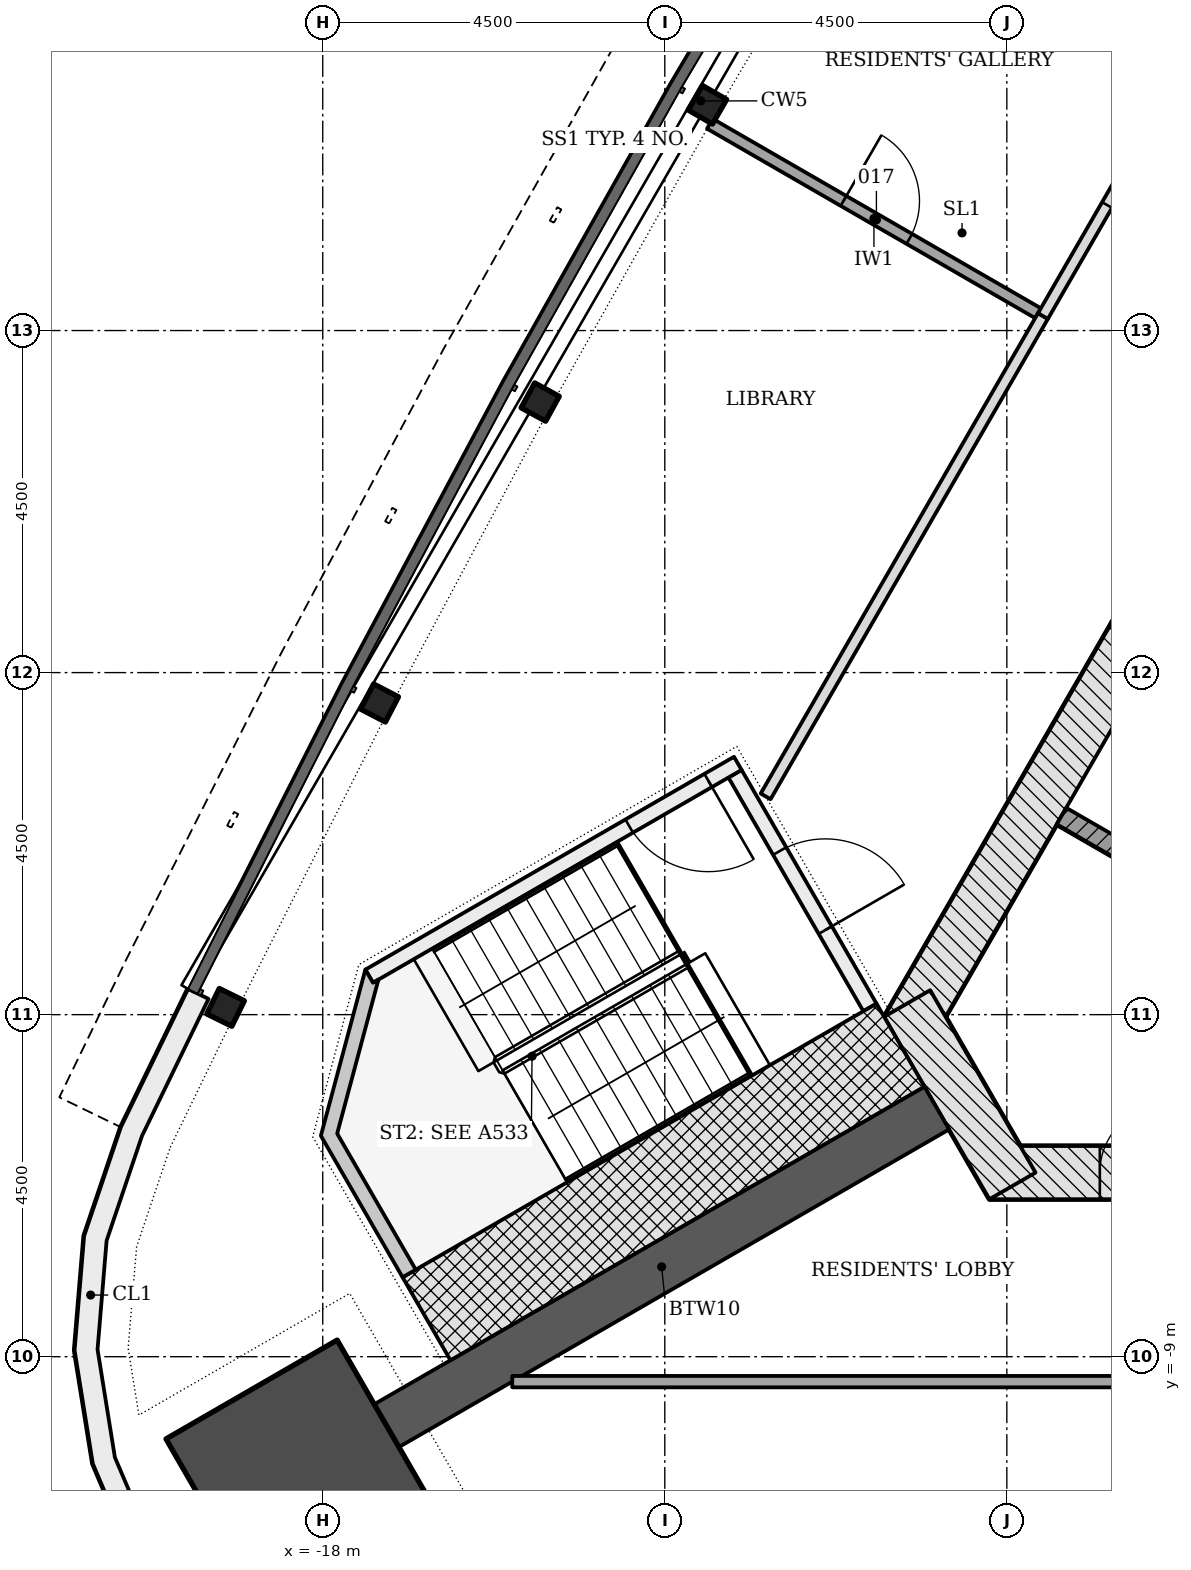
"""IFC4 building model, lengths in metres.
Left out: names, types, materials, properties, quantities, classifications, styles, units other than length and angle.
Written with IfcOpenShell. Run it as: python <this file> out.ifc"""

import sys

from ifc_helpers import new_model, si_unit, direction, frame, frame_2d, origin, origin_2d, place, context, subcontext, project, spatial, polyline, rectangle, i_section, outline, extrude, element, fill, save


model = new_model("IFC4")
c1 = context("Model", 3, precision=1e-05, world=origin(), true_north=direction((0.0, 1.0)))
c2 = subcontext(c1, "Body", "Model", "MODEL_VIEW")
j1 = project(units=[si_unit("LENGTHUNIT", "METRE"), si_unit("PLANEANGLEUNIT", "RADIAN")], contexts=[c1])
p1 = place(None, origin())
s1 = spatial("IfcSite", under=j1, at=p1, CompositionType="ELEMENT")
p2 = place(p1, origin())
s2 = spatial("IfcBuilding", under=s1, at=p2, CompositionType="ELEMENT")
p3 = place(p2, frame((0.0, 0.0, 214.8)))
s3 = spatial("IfcBuildingStorey", under=s2, at=p3, CompositionType="ELEMENT", Elevation=214.8)
p4 = place(p3, frame((-9.229, -6.578, -0.2), z_axis=(0.0, 0.0, 1.0), x_axis=(1.0, 0.0, 0.0)))
e1 = element("IfcWall", 1, at=p4, inside=s3, PredefinedType="SHEAR", context=c2, shape_type="SweptSolid", body=[
    extrude(rectangle(XDim=18.458, YDim=0.7, at=frame_2d((9.229, 0.0))), origin(), (0.0, 0.0, 1.0), 3.6),
])
p5 = place(p4, frame((6.7, 0.0, 0.2)))
e2 = element("IfcOpeningElement", 2, at=p5, cuts=e1, PredefinedType="OPENING", context=c2, shape_type="SweptSolid", body=[
    extrude(rectangle(XDim=1.0, YDim=2.1, at=frame_2d((0.5, 1.05))), frame((0.0, 0.36, 0.0), z_axis=(0.0, -1.0, 0.0), x_axis=(1.0, 0.0, 0.0)), (0.0, 0.0, 1.0), 0.72),
])
p6 = place(p4, frame((1.452, 0.0, 0.2)))
e3 = element("IfcOpeningElement", 3, at=p6, cuts=e1, PredefinedType="OPENING", context=c2, shape_type="SweptSolid", body=[
    extrude(rectangle(XDim=0.9, YDim=2.1, at=frame_2d((0.45, 1.05))), frame((0.0, 0.36, 0.0), z_axis=(0.0, -1.0, 0.0), x_axis=(1.0, 0.0, 0.0)), (0.0, 0.0, 1.0), 0.72),
])
p7 = place(p4, frame((4.45, 0.0, 0.2)))
e4 = element("IfcOpeningElement", 4, at=p7, cuts=e1, PredefinedType="OPENING", context=c2, shape_type="SweptSolid", body=[
    extrude(rectangle(XDim=1.0, YDim=2.1, at=frame_2d((0.5, 1.05))), frame((0.0, 0.36, 0.0), z_axis=(0.0, -1.0, 0.0), x_axis=(1.0, 0.0, 0.0)), (0.0, 0.0, 1.0), 0.72),
])
p8 = place(p4, frame((12.477, 0.0, 0.2)))
e5 = element("IfcOpeningElement", 5, at=p8, cuts=e1, PredefinedType="OPENING", context=c2, shape_type="SweptSolid", body=[
    extrude(rectangle(XDim=1.0, YDim=2.1, at=frame_2d((0.5, 1.05))), frame((0.0, 0.36, 0.0), z_axis=(0.0, -1.0, 0.0), x_axis=(1.0, 0.0, 0.0)), (0.0, 0.0, 1.0), 0.72),
])
p9 = place(p3, frame((-1.083, 11.281, -0.2), z_axis=(0.0, 0.0, 1.0), x_axis=(-0.500001446645, -0.866024568562, 0.0)))
e6 = element("IfcWall", 6, at=p9, inside=s3, PredefinedType="SHEAR", context=c2, shape_type="SweptSolid", body=[
    extrude(rectangle(XDim=18.458, YDim=0.7, at=frame_2d((9.229, 0.0))), origin(), (0.0, 0.0, 1.0), 3.6),
])
p10 = place(p9, frame((8.979, 0.0, 0.2)))
e7 = element("IfcOpeningElement", 7, at=p10, cuts=e6, PredefinedType="OPENING", context=c2, shape_type="SweptSolid", body=[
    extrude(rectangle(XDim=1.2, YDim=2.1, at=frame_2d((0.6, 1.05))), frame((0.0, 0.36, 0.0), z_axis=(0.0, -1.0, 0.0), x_axis=(1.0, 0.0, 0.0)), (0.0, 0.0, 1.0), 0.72),
])
p11 = place(p9, frame((11.029, 0.0, 0.2)))
e8 = element("IfcOpeningElement", 8, at=p11, cuts=e6, PredefinedType="OPENING", context=c2, shape_type="SweptSolid", body=[
    extrude(rectangle(XDim=1.2, YDim=2.1, at=frame_2d((0.6, 1.05))), frame((0.0, 0.36, 0.0), z_axis=(0.0, -1.0, 0.0), x_axis=(1.0, 0.0, 0.0)), (0.0, 0.0, 1.0), 0.72),
])
p12 = place(p3, frame((-10.311, -4.353, -0.2), z_axis=(0.0, 0.0, 1.0), x_axis=(0.500042739161, -0.866000726912, 0.0)))
e9 = element("IfcWall", 9, at=p12, inside=s3, PredefinedType="SHEAR", context=c2, shape_type="SweptSolid", body=[
    extrude(rectangle(XDim=2.771, YDim=0.7, at=frame_2d((1.386, 0.0))), origin(), (0.0, 0.0, 1.0), 3.6),
])
p13 = place(p3, frame((-9.922, -5.728, -0.2), z_axis=(0.0, 0.0, 1.0), x_axis=(-0.866030911543, -0.499990460161, 0.0)))
e10 = element("IfcWall", 10, at=p13, inside=s3, PredefinedType="SHEAR", context=c2, shape_type="SweptSolid", body=[
    extrude(rectangle(XDim=8.359, YDim=0.65, at=frame_2d((4.179, 0.0))), origin(), (0.0, 0.0, 1.0), 3.6),
])
p14 = place(p3, frame((-18.286, -10.558, -0.2), z_axis=(0.0, 0.0, 1.0), x_axis=(-0.866025403784, -0.5, 0.0)))
e11 = element("IfcColumn", 11, at=p14, inside=s3, PredefinedType="COLUMN", context=c2, shape_type="SweptSolid", body=[
    extrude(rectangle(XDim=2.6, YDim=2.6, at=origin_2d()), origin(), (0.0, 0.0, 1.0), 3.6),
])
for number, where, z_axis, x_axis in (
    (12, (-12.939, 7.47, -0.2), (0.0, 0.0, 1.0), (-0.5, -0.866, 0.0)),
    (13, (-15.14, 3.559, -0.2), (0.0, 0.0, 1.0), (-0.481, -0.877, 0.0)),
    (14, (-17.253, -0.4, -0.2), (0.0, 0.0, 1.0), (-0.461, -0.887, 0.0)),
    (15, (-19.279, -4.404, -0.2), (0.0, 0.0, 1.0), (-0.441, -0.897, 0.0)),
):
    element("IfcColumn", number, at=place(p3, frame(where, z_axis=z_axis, x_axis=x_axis)), inside=s3, PredefinedType="COLUMN", context=c2, shape_type="SweptSolid", body=[
        extrude(i_section(OverallWidth=0.373, OverallDepth=0.368, WebThickness=0.015, FlangeThickness=0.024, FilletRadius=0.015, at=origin_2d()), origin(), (0.0, 0.0, 1.0), 3.6),
    ])
p15 = place(p3, origin())
e16 = element("IfcWall", 16, at=p15, inside=s3, PredefinedType="NOTDEFINED", context=c2, shape_type="SweptSolid", body=[
    extrude(outline(polyline([(-19.772, -4.162), (-20.656, -5.98), (-21.139, -7.411), (-21.265, -8.917), (-21.025, -10.408), (-20.434, -11.797), (-19.526, -13.004), (-19.286, -12.824), (-20.172, -11.646), (-20.735, -10.324), (-20.963, -8.905), (-20.844, -7.473), (-20.378, -6.094), (-19.502, -4.293), (-19.772, -4.162)])), origin(), (0.0, 0.0, 1.0), 3.3),
])
p16 = place(p3, frame((-8.281, -1.887, -0.2), z_axis=(0.0, 0.0, 1.0), x_axis=(0.866032775405, -0.499987231761, 0.0)))
e17 = element("IfcWall", 17, at=p16, inside=s3, PredefinedType="PARTITIONING", context=c2, shape_type="SweptSolid", body=[
    extrude(rectangle(XDim=2.9, YDim=0.25, at=frame_2d((1.45, 0.0))), origin(), (0.0, 0.0, 1.0), 3.6),
])
p17 = place(p3, frame((-12.576, -1.331, -0.2), z_axis=(0.0, 0.0, 1.0), x_axis=(0.499970499736, -0.8660424351, 0.0)))
e18 = element("IfcWall", 18, at=p17, inside=s3, PredefinedType="SHEAR", context=c2, shape_type="SweptSolid", body=[
    extrude(rectangle(XDim=3.55, YDim=0.2, at=frame_2d((1.775, 0.0))), origin(), (0.0, 0.0, 1.0), 3.6),
])
p18 = place(p17, frame((1.175, 0.0, 0.2)))
e19 = element("IfcOpeningElement", 19, at=p18, cuts=e18, PredefinedType="OPENING", context=c2, shape_type="SweptSolid", body=[
    extrude(rectangle(XDim=1.2, YDim=2.1, at=frame_2d((0.6, 1.05))), frame((0.0, 0.11, 0.0), z_axis=(0.0, -1.0, 0.0), x_axis=(1.0, 0.0, 0.0)), (0.0, 0.0, 1.0), 0.22),
])
p19 = place(p3, frame((-12.539, -1.194, -0.2), z_axis=(0.0, 0.0, 1.0), x_axis=(-0.866045472092, -0.499965239061, 0.0)))
e20 = element("IfcWall", 20, at=p19, inside=s3, PredefinedType="SHEAR", context=c2, shape_type="SweptSolid", body=[
    extrude(rectangle(XDim=5.6, YDim=0.2, at=frame_2d((2.8, 0.0))), origin(), (0.0, 0.0, 1.0), 3.6),
])
p20 = place(p19, frame((0.45, 0.0, 0.2)))
e21 = element("IfcOpeningElement", 21, at=p20, cuts=e20, PredefinedType="OPENING", context=c2, shape_type="SweptSolid", body=[
    extrude(rectangle(XDim=1.2, YDim=2.1, at=frame_2d((0.6, 1.05))), frame((0.0, 0.11, 0.0), z_axis=(0.0, -1.0, 0.0), x_axis=(1.0, 0.0, 0.0)), (0.0, 0.0, 1.0), 0.22),
])
p21 = place(p3, frame((-10.399, -4.901, -0.2), z_axis=(0.0, 0.0, 1.0), x_axis=(-0.866018442252, -0.500012057535, 0.0)))
e22 = element("IfcWall", 22, at=p21, inside=s3, PredefinedType="SHEAR", context=c2, shape_type="SweptSolid", body=[
    extrude(rectangle(XDim=7.2, YDim=1.261, at=frame_2d((3.6, 0.0))), origin(), (0.0, 0.0, 1.0), 3.6),
])
p22 = place(p3, frame((0.0, 0.0, -0.2)))
e23 = element("IfcWall", 23, at=p22, inside=s3, PredefinedType="SHEAR", context=c2, shape_type="SweptSolid", body=[
    extrude(outline(polyline([(-17.439, -3.907), (-18.025, -6.093), (-16.95, -7.955), (-16.777, -7.855), (-17.81, -6.065), (-17.267, -4.039), (-17.339, -4.081), (-17.339, -4.081), (-17.339, -4.081), (-17.339, -4.081), (-17.339, -4.081), (-17.339, -4.081), (-17.339, -4.081), (-17.339, -4.081), (-17.339, -4.081), (-17.339, -4.081), (-17.339, -4.081), (-17.339, -4.081), (-17.339, -4.081), (-17.339, -4.081), (-17.339, -4.081), (-17.339, -4.081), (-17.339, -4.081), (-17.439, -3.907)])), origin(), (0.0, 0.0, 1.0), 3.6),
])
p23 = place(p3, frame((-15.507, -9.328, 0.0), z_axis=(0.0, 0.0, 1.0), x_axis=(1.0, 0.0, 0.0)))
e24 = element("IfcWall", 24, at=p23, inside=s3, PredefinedType="PARTITIONING", context=c2, shape_type="SweptSolid", body=[
    extrude(rectangle(XDim=23.234, YDim=0.15, at=frame_2d((11.617, 0.0))), origin(), (0.0, 0.0, 1.0), 2.852),
])
p24 = place(p23, frame((12.775, 0.0, 0.0)))
e25 = element("IfcOpeningElement", 25, at=p24, cuts=e24, PredefinedType="OPENING", context=c2, shape_type="SweptSolid", body=[
    extrude(rectangle(XDim=1.5, YDim=2.1, at=frame_2d((0.75, 1.05))), frame((0.0, 0.085, 0.0), z_axis=(0.0, -1.0, 0.0), x_axis=(1.0, 0.0, 0.0)), (0.0, 0.0, 1.0), 0.17),
])
p25 = place(p23, frame((18.971, 0.0, 0.0)))
e26 = element("IfcOpeningElement", 26, at=p25, cuts=e24, PredefinedType="OPENING", context=c2, shape_type="SweptSolid", body=[
    extrude(rectangle(XDim=1.0, YDim=2.1, at=frame_2d((0.5, 1.05))), frame((0.0, 0.085, 0.0), z_axis=(0.0, -1.0, 0.0), x_axis=(1.0, 0.0, 0.0)), (0.0, 0.0, 1.0), 0.17),
])
p26 = place(p3, frame((-8.525, 4.691, 0.0), z_axis=(0.0, 0.0, 1.0), x_axis=(-0.499986021771, -0.866033473968, 0.0)))
e27 = element("IfcWall", 27, at=p26, inside=s3, PredefinedType="PARTITIONING", context=c2, shape_type="SweptSolid", body=[
    extrude(rectangle(XDim=7.297, YDim=0.15, at=frame_2d((3.648, 0.0))), origin(), (0.0, 0.0, 1.0), 2.852),
])
p27 = place(p3, frame((-12.907, 7.221, 0.0), z_axis=(0.0, 0.0, 1.0), x_axis=(0.866031443676, -0.499989538455, 0.0)))
e28 = element("IfcWall", 28, at=p27, inside=s3, PredefinedType="PARTITIONING", context=c2, shape_type="SweptSolid", body=[
    extrude(rectangle(XDim=4.985, YDim=0.15, at=frame_2d((2.492, 0.0))), origin(), (0.0, 0.0, 1.0), 3.4),
])
p28 = place(p27, frame((2.03, 0.0, 0.0)))
e29 = element("IfcOpeningElement", 29, at=p28, cuts=e28, PredefinedType="OPENING", context=c2, shape_type="SweptSolid", body=[
    extrude(rectangle(XDim=1.0, YDim=2.1, at=frame_2d((0.5, 1.05))), frame((0.0, 0.085, 0.0), z_axis=(0.0, -1.0, 0.0), x_axis=(1.0, 0.0, 0.0)), (0.0, 0.0, 1.0), 0.17),
])
p29 = place(p3, frame((-6.338, 8.478, 0.0), z_axis=(0.0, 0.0, 1.0), x_axis=(-0.500005971936, -0.866021955858, 0.0)))
e30 = element("IfcWall", 30, at=p29, inside=s3, PredefinedType="PARTITIONING", context=c2, shape_type="SweptSolid", body=[
    extrude(rectangle(XDim=4.373, YDim=0.15, at=frame_2d((2.187, 0.0))), origin(), (0.0, 0.0, 1.0), 2.852),
])
p30 = place(p29, frame((1.687, 0.0, 0.0)))
e31 = element("IfcOpeningElement", 31, at=p30, cuts=e30, PredefinedType="OPENING", context=c2, shape_type="SweptSolid", body=[
    extrude(rectangle(XDim=1.0, YDim=2.1, at=frame_2d((0.5, 1.05))), frame((0.0, 0.085, 0.0), z_axis=(0.0, -1.0, 0.0), x_axis=(1.0, 0.0, 0.0)), (0.0, 0.0, 1.0), 0.17),
])
p31 = place(p6, origin())
e32 = element("IfcDoor", 32, at=p31, inside=s3, OperationType="SINGLE_SWING_RIGHT", PredefinedType="DOOR", context=c2, shape_type="SweptSolid", body=[
    extrude(rectangle(XDim=0.9, YDim=2.1, at=frame_2d((0.45, 1.05))), frame((0.0, 0.075, 0.0), z_axis=(0.0, -1.0, 0.0), x_axis=(1.0, 0.0, 0.0)), (0.0, 0.0, 1.0), 0.15),
])
fill(e3, e32)
p32 = place(p18, origin())
e33 = element("IfcDoor", 33, at=p32, inside=s3, OperationType="SINGLE_SWING_RIGHT", PredefinedType="DOOR", context=c2, shape_type="SweptSolid", body=[
    extrude(rectangle(XDim=1.2, YDim=2.1, at=frame_2d((0.6, 1.05))), frame((0.0, 0.025, 0.0), z_axis=(0.0, -1.0, 0.0), x_axis=(1.0, 0.0, 0.0)), (0.0, 0.0, 1.0), 0.05),
])
fill(e19, e33)
p33 = place(p20, origin())
e34 = element("IfcDoor", 34, at=p33, inside=s3, OperationType="SINGLE_SWING_LEFT", PredefinedType="DOOR", context=c2, shape_type="SweptSolid", body=[
    extrude(rectangle(XDim=1.2, YDim=2.1, at=frame_2d((0.6, 1.05))), frame((0.0, 0.025, 0.0), z_axis=(0.0, -1.0, 0.0), x_axis=(1.0, 0.0, 0.0)), (0.0, 0.0, 1.0), 0.05),
])
fill(e21, e34)
p34 = place(p30, origin())
e35 = element("IfcDoor", 35, at=p34, inside=s3, OperationType="SINGLE_SWING_LEFT", PredefinedType="DOOR", context=c2, shape_type="SweptSolid", body=[
    extrude(rectangle(XDim=1.0, YDim=2.1, at=frame_2d((0.5, 1.05))), frame((0.0, 0.025, 0.0), z_axis=(0.0, -1.0, 0.0), x_axis=(1.0, 0.0, 0.0)), (0.0, 0.0, 1.0), 0.05),
])
fill(e31, e35)
p35 = place(p28, origin())
e36 = element("IfcDoor", 36, at=p35, inside=s3, OperationType="SINGLE_SWING_LEFT", PredefinedType="DOOR", context=c2, shape_type="SweptSolid", body=[
    extrude(rectangle(XDim=1.0, YDim=2.1, at=frame_2d((0.5, 1.05))), frame((0.0, 0.025, 0.0), z_axis=(0.0, -1.0, 0.0), x_axis=(1.0, 0.0, 0.0)), (0.0, 0.0, 1.0), 0.05),
])
fill(e29, e36)
save(model, sys.argv[1])
